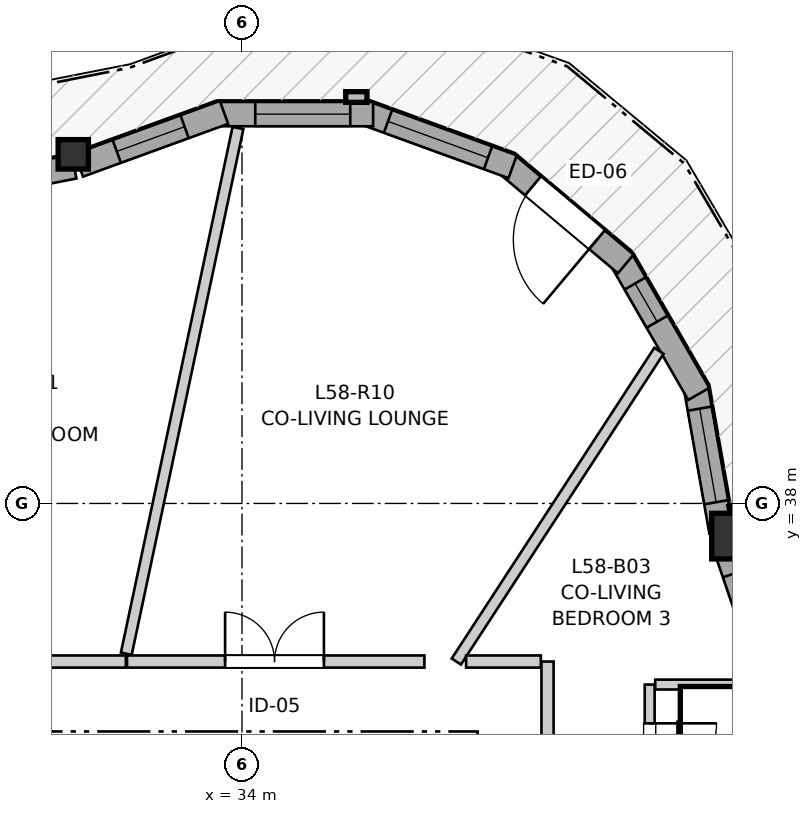
"""IFC4 building model, lengths in metres.
Left out: names, types, materials, properties, quantities, classifications, styles, units other than length and angle.
Written with IfcOpenShell. Run it as: python <this file> out.ifc"""

import sys

from ifc_helpers import new_model, si_unit, direction, frame, frame_2d, origin, origin_2d, place, context, subcontext, project, spatial, rectangle, i_section, extrude, source, transform, mapped, element, fill, save


model = new_model("IFC4")
c1 = context("Model", 3, precision=1e-05, world=origin(), true_north=direction((0.0, 1.0)))
c2 = subcontext(c1, "Body", "Model", "MODEL_VIEW")
j1 = project(units=[si_unit("LENGTHUNIT", "METRE"), si_unit("PLANEANGLEUNIT", "RADIAN")], contexts=[c1])
p1 = place(None, origin())
s1 = spatial("IfcSite", under=j1, at=p1, CompositionType="ELEMENT")
p2 = place(p1, origin())
s2 = spatial("IfcBuilding", under=s1, at=p2, CompositionType="ELEMENT")
p3 = place(p2, frame((0.0, 0.0, 195.6)))
s3 = spatial("IfcBuildingStorey", under=s2, at=p3, CompositionType="ELEMENT", Elevation=195.6)
m1 = source(origin(), c2, "Body", "SweptSolid", [
    extrude(rectangle(XDim=0.6, YDim=0.6, at=origin_2d()), origin(), (0.0, 0.0, 1.0), 2.96),
])
p4 = place(p3, frame((40.48, 37.57, 0.0), z_axis=(0.0, 0.0, 1.0), x_axis=(1.0, 0.0, 0.0)))
e1 = element("IfcColumn", 1, at=p4, inside=s3, PredefinedType="COLUMN", context=c2, shape_type="MappedRepresentation", body=[
    mapped(m1, transform((0.0, 0.0, 0.0), x_axis=(1.0, 0.0, 0.0), y_axis=(0.0, 1.0, 0.0), z_axis=(0.0, 0.0, 1.0), scale=1.0)),
])
m2 = source(origin(), c2, "Body", "SweptSolid", [
    extrude(i_section(OverallWidth=0.398, OverallDepth=0.387, WebThickness=0.019, FlangeThickness=0.03, FilletRadius=0.015, at=origin_2d()), origin(), (0.0, 0.0, 1.0), 2.96),
])
p5 = place(p3, frame((31.78, 42.593, 0.0), z_axis=(0.0, 0.0, 1.0), x_axis=(1.0, 0.0, 0.0)))
e2 = element("IfcColumn", 2, at=p5, inside=s3, PredefinedType="PILASTER", context=c2, shape_type="MappedRepresentation", body=[
    mapped(m2, transform((0.0, 0.0, 0.0), x_axis=(1.0, 0.0, 0.0), y_axis=(0.0, 1.0, 0.0), z_axis=(0.0, 0.0, 1.0), scale=1.0)),
])
p6 = place(p3, frame((41.132, 35.168, 0.0), z_axis=(0.0, 0.0, 1.0), x_axis=(-0.323654036362, 0.94617549363, 0.0)))
e3 = element("IfcWall", 3, at=p6, inside=s3, PredefinedType="SOLIDWALL", context=c2, shape_type="SweptSolid", body=[
    extrude(rectangle(XDim=2.394, YDim=0.32, at=frame_2d((1.197, 0.0))), origin(), (0.0, 0.0, 1.0), 2.58),
])
p7 = place(p6, frame((0.67, 0.0, 0.82)))
e4 = element("IfcOpeningElement", 4, at=p7, cuts=e3, PredefinedType="OPENING", context=c2, shape_type="SweptSolid", body=[
    extrude(rectangle(XDim=1.35, YDim=1.45, at=frame_2d((0.675, 0.725))), frame((0.0, 0.17, 0.0), z_axis=(0.0, -1.0, 0.0), x_axis=(1.0, 0.0, 0.0)), (0.0, 0.0, 1.0), 0.34),
])
p8 = place(p3, frame((40.307, 37.631, 0.0), z_axis=(0.0, 0.0, 1.0), x_axis=(-0.173671780312, 0.984803590937, 0.0)))
e5 = element("IfcWall", 5, at=p8, inside=s3, PredefinedType="SOLIDWALL", context=c2, shape_type="SweptSolid", body=[
    extrude(rectangle(XDim=1.962, YDim=0.32, at=frame_2d((0.981, 0.0))), origin(), (0.0, 0.0, 1.0), 2.58),
])
p9 = place(p8, frame((0.391, 0.0, 0.82)))
e6 = element("IfcOpeningElement", 6, at=p9, cuts=e5, PredefinedType="OPENING", context=c2, shape_type="SweptSolid", body=[
    extrude(rectangle(XDim=1.25, YDim=1.35, at=frame_2d((0.625, 0.675))), frame((0.0, 0.17, 0.0), z_axis=(0.0, -1.0, 0.0), x_axis=(1.0, 0.0, 0.0)), (0.0, 0.0, 1.0), 0.34),
])
p10 = place(p3, frame((40.01, 39.441, 0.0), z_axis=(0.0, 0.0, 1.0), x_axis=(-0.49990781971, 0.866078617559, 0.0)))
e7 = element("IfcWall", 7, at=p10, inside=s3, PredefinedType="SOLIDWALL", context=c2, shape_type="SweptSolid", body=[
    extrude(rectangle(XDim=2.09, YDim=0.32, at=frame_2d((1.045, 0.0))), origin(), (0.0, 0.0, 1.0), 2.58),
])
p11 = place(p10, frame((1.097, 0.0, 0.82)))
e8 = element("IfcOpeningElement", 8, at=p11, cuts=e7, PredefinedType="OPENING", context=c2, shape_type="SweptSolid", body=[
    extrude(rectangle(XDim=0.58, YDim=1.35, at=frame_2d((0.29, 0.675))), frame((0.0, 0.17, 0.0), z_axis=(0.0, -1.0, 0.0), x_axis=(1.0, 0.0, 0.0)), (0.0, 0.0, 1.0), 0.34),
])
p12 = place(p3, frame((39.049, 41.151, 0.0), z_axis=(0.0, 0.0, 1.0), x_axis=(-0.766082082368, 0.642742750308, 0.0)))
e9 = element("IfcWall", 9, at=p12, inside=s3, PredefinedType="SOLIDWALL", context=c2, shape_type="SweptSolid", body=[
    extrude(rectangle(XDim=2.09, YDim=0.32, at=frame_2d((1.045, 0.0))), origin(), (0.0, 0.0, 1.0), 2.58),
])
p13 = place(p12, frame((0.495, 0.0, 0.0)))
e10 = element("IfcOpeningElement", 10, at=p13, cuts=e9, PredefinedType="OPENING", context=c2, shape_type="SweptSolid", body=[
    extrude(rectangle(XDim=1.1, YDim=2.1, at=frame_2d((0.55, 1.05))), frame((0.0, 0.17, 0.0), z_axis=(0.0, -1.0, 0.0), x_axis=(1.0, 0.0, 0.0)), (0.0, 0.0, 1.0), 0.34),
])
p14 = place(p3, frame((37.561, 42.43, 0.0), z_axis=(0.0, 0.0, 1.0), x_axis=(-0.939711556618, 0.341968113072, 0.0)))
e11 = element("IfcWall", 11, at=p14, inside=s3, PredefinedType="SOLIDWALL", context=c2, shape_type="SweptSolid", body=[
    extrude(rectangle(XDim=2.09, YDim=0.32, at=frame_2d((1.045, 0.0))), origin(), (0.0, 0.0, 1.0), 2.58),
])
p15 = place(p14, frame((0.345, 0.0, 0.82)))
e12 = element("IfcOpeningElement", 12, at=p15, cuts=e11, PredefinedType="OPENING", context=c2, shape_type="SweptSolid", body=[
    extrude(rectangle(XDim=1.4, YDim=1.35, at=frame_2d((0.7, 0.675))), frame((0.0, 0.17, 0.0), z_axis=(0.0, -1.0, 0.0), x_axis=(1.0, 0.0, 0.0)), (0.0, 0.0, 1.0), 0.34),
])
p16 = place(p3, frame((35.725, 43.122, 0.0), z_axis=(0.0, 0.0, 1.0), x_axis=(-1.0, 0.0, 0.0)))
e13 = element("IfcWall", 13, at=p16, inside=s3, PredefinedType="SOLIDWALL", context=c2, shape_type="SweptSolid", body=[
    extrude(rectangle(XDim=2.09, YDim=0.32, at=frame_2d((1.045, 0.0))), origin(), (0.0, 0.0, 1.0), 2.58),
])
p17 = place(p16, frame((0.301, 0.0, 0.82)))
e14 = element("IfcOpeningElement", 14, at=p17, cuts=e13, PredefinedType="OPENING", context=c2, shape_type="SweptSolid", body=[
    extrude(rectangle(XDim=1.25, YDim=1.35, at=frame_2d((0.625, 0.675))), frame((0.0, 0.17, 0.0), z_axis=(0.0, -1.0, 0.0), x_axis=(1.0, 0.0, 0.0)), (0.0, 0.0, 1.0), 0.34),
])
p18 = place(p3, frame((33.763, 43.145, 0.0), z_axis=(0.0, 0.0, 1.0), x_axis=(-0.939691662178, -0.342022777067, 0.0)))
e15 = element("IfcWall", 15, at=p18, inside=s3, PredefinedType="SOLIDWALL", context=c2, shape_type="SweptSolid", body=[
    extrude(rectangle(XDim=2.032, YDim=0.32, at=frame_2d((1.016, 0.0))), origin(), (0.0, 0.0, 1.0), 2.58),
])
p19 = place(p18, frame((0.551, 0.0, 0.82)))
e16 = element("IfcOpeningElement", 16, at=p19, cuts=e15, PredefinedType="OPENING", context=c2, shape_type="SweptSolid", body=[
    extrude(rectangle(XDim=0.95, YDim=1.35, at=frame_2d((0.475, 0.675))), frame((0.0, 0.17, 0.0), z_axis=(0.0, -1.0, 0.0), x_axis=(1.0, 0.0, 0.0)), (0.0, 0.0, 1.0), 0.34),
])
p20 = place(p3, frame((31.791, 42.432, 0.0), z_axis=(0.0, 0.0, 1.0), x_axis=(-0.981230743763, -0.192837308358, 0.0)))
e17 = element("IfcWall", 17, at=p20, inside=s3, PredefinedType="SOLIDWALL", context=c2, shape_type="SweptSolid", body=[
    extrude(rectangle(XDim=2.464, YDim=0.32, at=frame_2d((1.232, 0.0))), origin(), (0.0, 0.0, 1.0), 2.58),
])
p21 = place(p20, frame((0.497, 0.0, 0.82)))
e18 = element("IfcOpeningElement", 18, at=p21, cuts=e17, PredefinedType="OPENING", context=c2, shape_type="SweptSolid", body=[
    extrude(rectangle(XDim=1.45, YDim=1.25, at=frame_2d((0.725, 0.625))), frame((0.0, 0.17, 0.0), z_axis=(0.0, -1.0, 0.0), x_axis=(1.0, 0.0, 0.0)), (0.0, 0.0, 1.0), 0.34),
])
p22 = place(p3, frame((27.156, 35.92, 0.0), z_axis=(0.0, 0.0, 1.0), x_axis=(1.0, 0.0, 0.0)))
e19 = element("IfcWall", 19, at=p22, inside=s3, PredefinedType="PARTITIONING", context=c2, shape_type="SweptSolid", body=[
    extrude(rectangle(XDim=5.316, YDim=0.16, at=frame_2d((2.658, 0.0))), origin(), (0.0, 0.0, 1.0), 2.628),
])
p23 = place(p22, frame((2.178, 0.0, 0.0)))
e20 = element("IfcOpeningElement", 20, at=p23, cuts=e19, PredefinedType="OPENING", context=c2, shape_type="SweptSolid", body=[
    extrude(rectangle(XDim=0.96, YDim=2.1, at=frame_2d((0.48, 1.05))), frame((0.0, 0.09, 0.0), z_axis=(0.0, -1.0, 0.0), x_axis=(1.0, 0.0, 0.0)), (0.0, 0.0, 1.0), 0.18),
])
p24 = place(p3, frame((32.487, 35.92, 0.0), z_axis=(0.0, 0.0, 1.0), x_axis=(1.0, 0.0, 0.0)))
e21 = element("IfcWall", 21, at=p24, inside=s3, PredefinedType="PARTITIONING", context=c2, shape_type="SweptSolid", body=[
    extrude(rectangle(XDim=3.913, YDim=0.16, at=frame_2d((1.957, 0.0))), origin(), (0.0, 0.0, 1.0), 2.628),
])
p25 = place(p24, frame((1.291, 0.0, 0.0)))
e22 = element("IfcOpeningElement", 22, at=p25, cuts=e21, PredefinedType="OPENING", context=c2, shape_type="SweptSolid", body=[
    extrude(rectangle(XDim=1.3, YDim=2.1, at=frame_2d((0.65, 1.05))), frame((0.0, 0.09, 0.0), z_axis=(0.0, -1.0, 0.0), x_axis=(1.0, 0.0, 0.0)), (0.0, 0.0, 1.0), 0.18),
])
p26 = place(p3, frame((39.364, 35.617, 0.0), z_axis=(0.0, 0.0, 1.0), x_axis=(0.0, -1.0, 0.0)))
e23 = element("IfcWall", 23, at=p26, inside=s3, PredefinedType="PARTITIONING", context=c2, shape_type="SweptSolid", body=[
    extrude(rectangle(XDim=1.9, YDim=0.13, at=frame_2d((0.95, 0.0))), origin(), (0.0, 0.0, 1.0), 2.598),
])
p27 = place(p26, frame((0.51, 0.0, 0.0)))
e24 = element("IfcOpeningElement", 24, at=p27, cuts=e23, PredefinedType="OPENING", context=c2, shape_type="SweptSolid", body=[
    extrude(rectangle(XDim=0.88, YDim=2.05, at=frame_2d((0.44, 1.025))), frame((0.0, 0.075, 0.0), z_axis=(0.0, -1.0, 0.0), x_axis=(1.0, 0.0, 0.0)), (0.0, 0.0, 1.0), 0.15),
])
p28 = place(p3, frame((32.478, 36.023, 0.0), z_axis=(0.0, 0.0, 1.0), x_axis=(0.207795571792, 0.978172275391, 0.0)))
e25 = element("IfcWall", 25, at=p28, inside=s3, PredefinedType="PARTITIONING", context=c2, shape_type="SweptSolid", body=[
    extrude(rectangle(XDim=7.071, YDim=0.145, at=frame_2d((3.535, 0.0))), origin(), (0.0, 0.0, 1.0), 2.96),
])
p29 = place(p3, frame((36.82, 35.92, 0.0), z_axis=(0.0, 0.0, 1.0), x_axis=(0.546222005159, 0.83764044857, 0.0)))
e26 = element("IfcWall", 26, at=p29, inside=s3, PredefinedType="PARTITIONING", context=c2, shape_type="SweptSolid", body=[
    extrude(rectangle(XDim=4.881, YDim=0.145, at=frame_2d((2.44, 0.0))), origin(), (0.0, 0.0, 1.0), 2.96),
])
p30 = place(p3, frame((38.02, 34.315, 0.0), z_axis=(0.0, 0.0, 1.0), x_axis=(0.0, 1.0, 0.0)))
e27 = element("IfcWall", 27, at=p30, inside=s3, PredefinedType="PARTITIONING", context=c2, shape_type="SweptSolid", body=[
    extrude(rectangle(XDim=1.605, YDim=0.16, at=frame_2d((0.802, 0.0))), origin(), (0.0, 0.0, 1.0), 2.628),
])
p31 = place(p3, frame((39.437, 35.617, 0.0), z_axis=(0.0, 0.0, 1.0), x_axis=(1.0, 0.0, 0.0)))
e28 = element("IfcWall", 28, at=p31, inside=s3, PredefinedType="PARTITIONING", context=c2, shape_type="SweptSolid", body=[
    extrude(rectangle(XDim=1.361, YDim=0.13, at=frame_2d((0.68, 0.0))), origin(), (0.0, 0.0, 1.0), 2.96),
])
p32 = place(p3, frame((36.949, 35.92, 0.0), z_axis=(0.0, 0.0, 1.0), x_axis=(1.0, 0.0, 0.0)))
e29 = element("IfcWall", 29, at=p32, inside=s3, PredefinedType="PARTITIONING", context=c2, shape_type="SweptSolid", body=[
    extrude(rectangle(XDim=0.983, YDim=0.16, at=frame_2d((0.492, 0.0))), origin(), (0.0, 0.0, 1.0), 2.96),
])
m3 = source(origin(), c2, "Body", "SweptSolid", [
    extrude(rectangle(XDim=1.35, YDim=1.45, at=frame_2d((0.675, 0.725))), frame((0.0, 0.03, 0.0), z_axis=(0.0, -1.0, 0.0), x_axis=(1.0, 0.0, 0.0)), (0.0, 0.0, 1.0), 0.06),
])
p33 = place(p7, origin())
e30 = element("IfcWindow", 30, at=p33, inside=s3, PartitioningType="SINGLE_PANEL", PredefinedType="WINDOW", context=c2, shape_type="MappedRepresentation", body=[
    mapped(m3, transform((0.0, 0.0, 0.0), x_axis=(1.0, 0.0, 0.0), y_axis=(0.0, 1.0, 0.0), z_axis=(0.0, 0.0, 1.0), scale=1.0)),
])
fill(e4, e30)
m4 = source(origin(), c2, "Body", "SweptSolid", [
    extrude(rectangle(XDim=1.25, YDim=1.35, at=frame_2d((0.625, 0.675))), frame((0.0, 0.03, 0.0), z_axis=(0.0, -1.0, 0.0), x_axis=(1.0, 0.0, 0.0)), (0.0, 0.0, 1.0), 0.06),
])
p34 = place(p9, origin())
e31 = element("IfcWindow", 31, at=p34, inside=s3, PartitioningType="SINGLE_PANEL", PredefinedType="WINDOW", context=c2, shape_type="MappedRepresentation", body=[
    mapped(m4, transform((0.0, 0.0, 0.0), x_axis=(1.0, 0.0, 0.0), y_axis=(0.0, 1.0, 0.0), z_axis=(0.0, 0.0, 1.0), scale=1.0)),
])
fill(e6, e31)
m5 = source(origin(), c2, "Body", "SweptSolid", [
    extrude(rectangle(XDim=0.58, YDim=1.35, at=frame_2d((0.29, 0.675))), frame((0.0, 0.03, 0.0), z_axis=(0.0, -1.0, 0.0), x_axis=(1.0, 0.0, 0.0)), (0.0, 0.0, 1.0), 0.06),
])
p35 = place(p11, origin())
e32 = element("IfcWindow", 32, at=p35, inside=s3, PartitioningType="SINGLE_PANEL", PredefinedType="WINDOW", context=c2, shape_type="MappedRepresentation", body=[
    mapped(m5, transform((0.0, 0.0, 0.0), x_axis=(1.0, 0.0, 0.0), y_axis=(0.0, 1.0, 0.0), z_axis=(0.0, 0.0, 1.0), scale=1.0)),
])
fill(e8, e32)
m6 = source(origin(), c2, "Body", "SweptSolid", [
    extrude(rectangle(XDim=1.1, YDim=2.1, at=frame_2d((0.55, 1.05))), frame((0.0, 0.025, 0.0), z_axis=(0.0, -1.0, 0.0), x_axis=(1.0, 0.0, 0.0)), (0.0, 0.0, 1.0), 0.05),
])
p36 = place(p13, origin())
e33 = element("IfcDoor", 33, at=p36, inside=s3, OperationType="SINGLE_SWING_LEFT", PredefinedType="DOOR", context=c2, shape_type="MappedRepresentation", body=[
    mapped(m6, transform((0.0, 0.0, 0.0), x_axis=(1.0, 0.0, 0.0), y_axis=(0.0, 1.0, 0.0), z_axis=(0.0, 0.0, 1.0), scale=1.0)),
])
fill(e10, e33)
m7 = source(origin(), c2, "Body", "SweptSolid", [
    extrude(rectangle(XDim=1.4, YDim=1.35, at=frame_2d((0.7, 0.675))), frame((0.0, 0.03, 0.0), z_axis=(0.0, -1.0, 0.0), x_axis=(1.0, 0.0, 0.0)), (0.0, 0.0, 1.0), 0.06),
])
p37 = place(p15, origin())
e34 = element("IfcWindow", 34, at=p37, inside=s3, PartitioningType="SINGLE_PANEL", PredefinedType="WINDOW", context=c2, shape_type="MappedRepresentation", body=[
    mapped(m7, transform((0.0, 0.0, 0.0), x_axis=(1.0, 0.0, 0.0), y_axis=(0.0, 1.0, 0.0), z_axis=(0.0, 0.0, 1.0), scale=1.0)),
])
fill(e12, e34)
p38 = place(p17, origin())
e35 = element("IfcWindow", 35, at=p38, inside=s3, PartitioningType="SINGLE_PANEL", PredefinedType="WINDOW", context=c2, shape_type="MappedRepresentation", body=[
    mapped(m4, transform((0.0, 0.0, 0.0), x_axis=(1.0, 0.0, 0.0), y_axis=(0.0, 1.0, 0.0), z_axis=(0.0, 0.0, 1.0), scale=1.0)),
])
fill(e14, e35)
m8 = source(origin(), c2, "Body", "SweptSolid", [
    extrude(rectangle(XDim=0.95, YDim=1.35, at=frame_2d((0.475, 0.675))), frame((0.0, 0.03, 0.0), z_axis=(0.0, -1.0, 0.0), x_axis=(1.0, 0.0, 0.0)), (0.0, 0.0, 1.0), 0.06),
])
p39 = place(p19, origin())
e36 = element("IfcWindow", 36, at=p39, inside=s3, PartitioningType="SINGLE_PANEL", PredefinedType="WINDOW", context=c2, shape_type="MappedRepresentation", body=[
    mapped(m8, transform((0.0, 0.0, 0.0), x_axis=(1.0, 0.0, 0.0), y_axis=(0.0, 1.0, 0.0), z_axis=(0.0, 0.0, 1.0), scale=1.0)),
])
fill(e16, e36)
m9 = source(origin(), c2, "Body", "SweptSolid", [
    extrude(rectangle(XDim=1.3, YDim=2.1, at=frame_2d((0.65, 1.05))), frame((0.0, 0.025, 0.0), z_axis=(0.0, -1.0, 0.0), x_axis=(1.0, 0.0, 0.0)), (0.0, 0.0, 1.0), 0.05),
])
p40 = place(p25, origin())
e37 = element("IfcDoor", 37, at=p40, inside=s3, OperationType="DOUBLE_DOOR_SINGLE_SWING", PredefinedType="DOOR", context=c2, shape_type="MappedRepresentation", body=[
    mapped(m9, transform((0.0, 0.0, 0.0), x_axis=(1.0, 0.0, 0.0), y_axis=(0.0, 1.0, 0.0), z_axis=(0.0, 0.0, 1.0), scale=1.0)),
])
fill(e22, e37)
m10 = source(origin(), c2, "Body", "SweptSolid", [
    extrude(rectangle(XDim=0.88, YDim=2.05, at=frame_2d((0.44, 1.025))), frame((0.0, 0.025, 0.0), z_axis=(0.0, -1.0, 0.0), x_axis=(1.0, 0.0, 0.0)), (0.0, 0.0, 1.0), 0.05),
])
p41 = place(p27, origin())
e38 = element("IfcDoor", 38, at=p41, inside=s3, OperationType="SINGLE_SWING_LEFT", PredefinedType="DOOR", context=c2, shape_type="MappedRepresentation", body=[
    mapped(m10, transform((0.0, 0.0, 0.0), x_axis=(1.0, 0.0, 0.0), y_axis=(0.0, 1.0, 0.0), z_axis=(0.0, 0.0, 1.0), scale=1.0)),
])
fill(e24, e38)
save(model, sys.argv[1])
